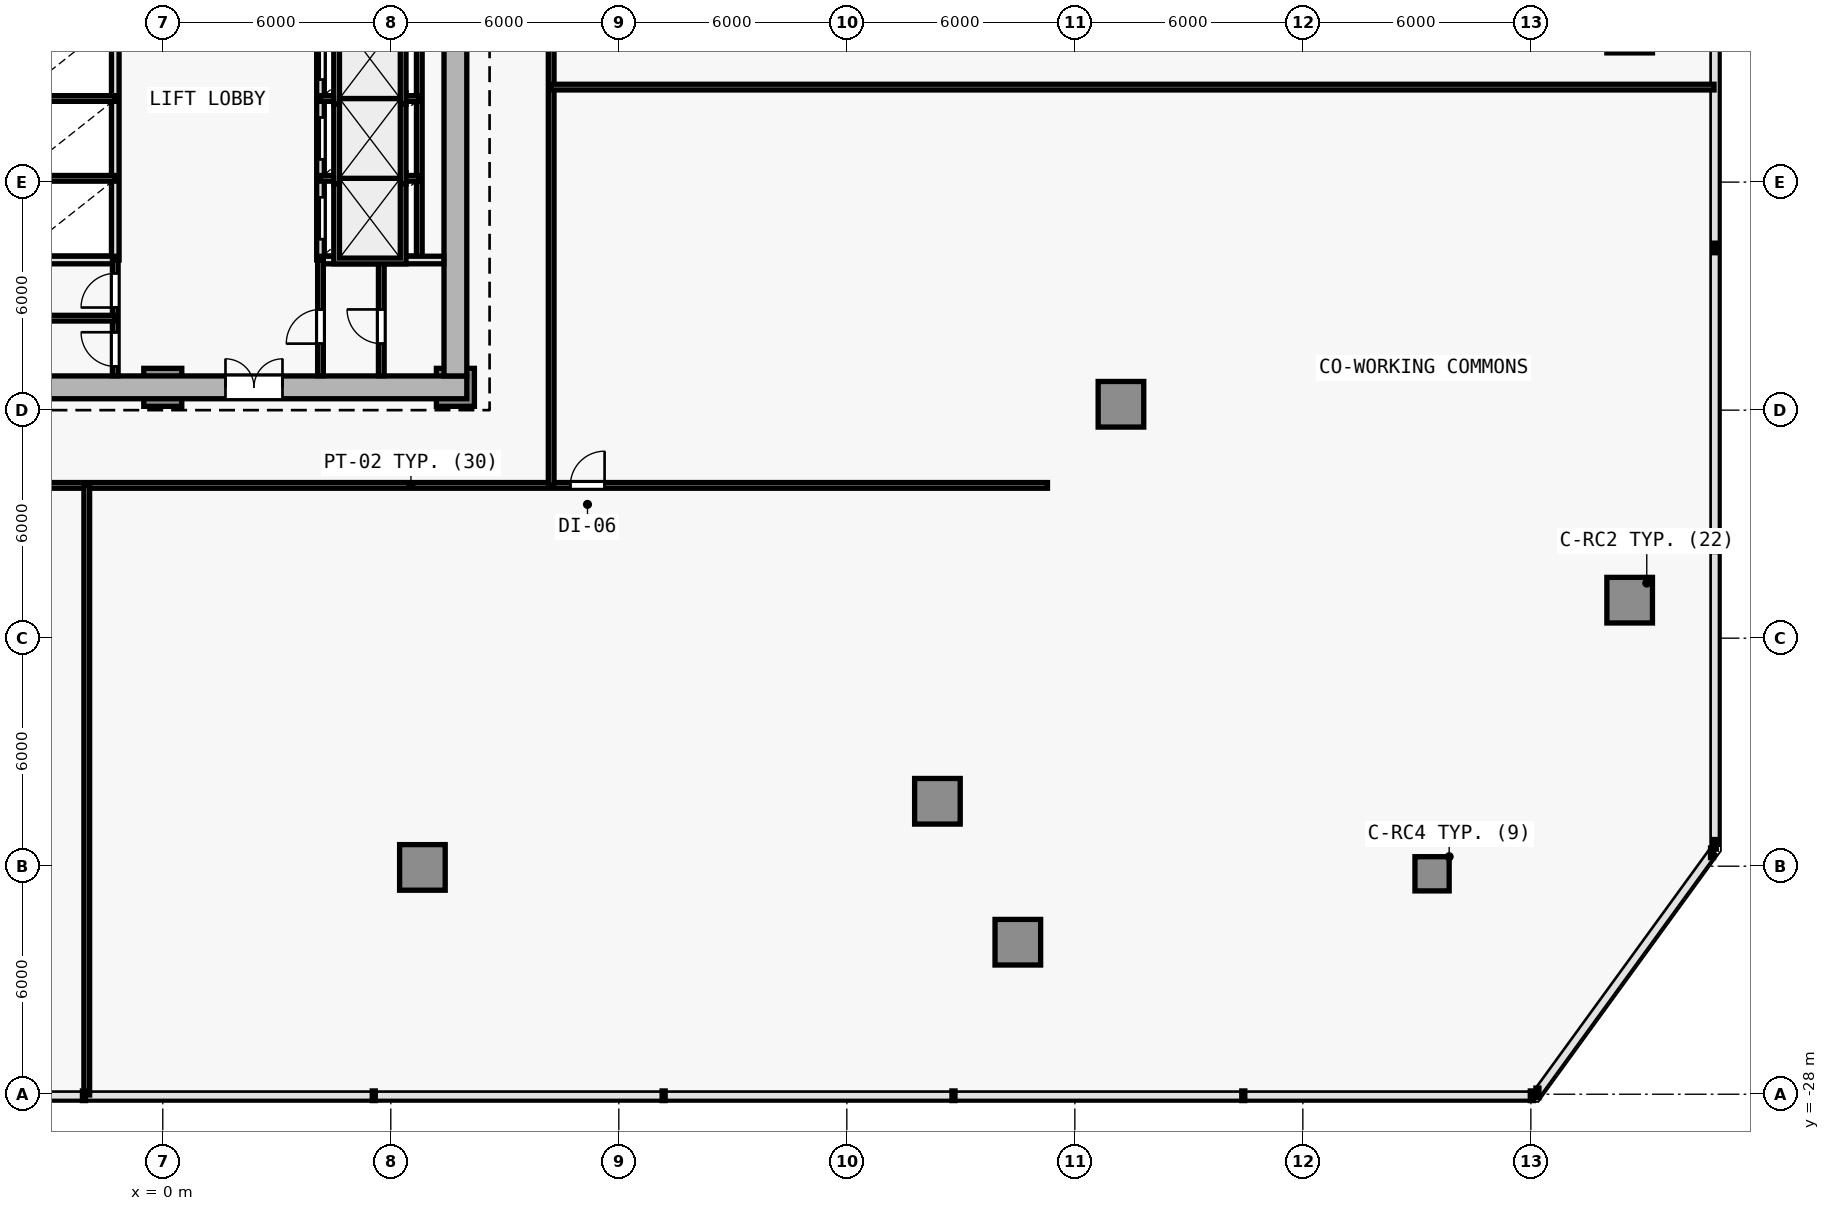
"""IFC4 building model, lengths in metres.
Left out: names, types, materials, properties, quantities, classifications, styles, units other than length and angle.
Written with IfcOpenShell. Run it as: python <this file> out.ifc"""

import sys

from ifc_helpers import new_model, si_unit, direction, frame, frame_2d, origin, origin_2d, place, context, subcontext, project, spatial, rectangle, extrude, element, fill, save


model = new_model("IFC4")
c1 = context("Model", 3, precision=1e-05, world=origin(), true_north=direction((0.0, 1.0)))
c2 = subcontext(c1, "Body", "Model", "MODEL_VIEW")
j1 = project(units=[si_unit("LENGTHUNIT", "METRE"), si_unit("PLANEANGLEUNIT", "RADIAN")], contexts=[c1])
p1 = place(None, origin())
s1 = spatial("IfcSite", under=j1, at=p1, CompositionType="ELEMENT")
p2 = place(p1, origin())
s2 = spatial("IfcBuilding", under=s1, at=p2, CompositionType="ELEMENT")
p3 = place(p2, frame((0.0, 0.0, 9.2)))
s3 = spatial("IfcBuildingStorey", under=s2, at=p3, CompositionType="ELEMENT", Elevation=9.2)
for number, where, z_axis, x_axis in (
    (1, (7.7, -9.4, 0.0), (0.0, 0.0, 1.0), (1.0, 0.0, 0.0)),
    (2, (0.0, -9.4, 0.0), (0.0, 0.0, 1.0), (1.0, 0.0, 0.0)),
):
    element("IfcColumn", number, at=place(p3, frame(where, z_axis=z_axis, x_axis=x_axis)), inside=s3, PredefinedType="COLUMN", context=c2, shape_type="SweptSolid", body=[
        extrude(rectangle(XDim=1.0, YDim=1.0, at=origin_2d()), origin(), (0.0, 0.0, 1.0), 4.2),
    ])
for number, where, z_axis, x_axis in (
    (3, (38.6, -15.0, 0.0), (0.0, 0.0, 1.0), (1.0, 0.0, 0.0)),
    (4, (38.6, 0.0, 0.0), (0.0, 0.0, 1.0), (1.0, 0.0, 0.0)),
    (5, (22.5, -24.0, 0.0), (0.0, 0.0, 1.0), (1.0, 0.0, 0.0)),
    (6, (6.832, -22.032, 0.0), (0.0, 0.0, 1.0), (1.0, 0.0, 0.0)),
    (7, (20.384, -20.292, 0.0), (0.0, 0.0, 1.0), (1.0, 0.0, 0.0)),
    (8, (25.213, -9.845, 0.0), (0.0, 0.0, 1.0), (1.0, 0.0, 0.0)),
):
    element("IfcColumn", number, at=place(p3, frame(where, z_axis=z_axis, x_axis=x_axis)), inside=s3, PredefinedType="COLUMN", context=c2, shape_type="SweptSolid", body=[
        extrude(rectangle(XDim=1.2, YDim=1.2, at=origin_2d()), origin(), (0.0, 0.0, 1.0), 4.2),
    ])
p4 = place(p3, frame((33.4, -22.2, 0.0), z_axis=(0.0, 0.0, 1.0), x_axis=(1.0, 0.0, 0.0)))
e9 = element("IfcColumn", 9, at=p4, inside=s3, PredefinedType="COLUMN", context=c2, shape_type="SweptSolid", body=[
    extrude(rectangle(XDim=0.9, YDim=0.9, at=origin_2d()), origin(), (0.0, 0.0, 1.0), 4.2),
])
p5 = place(p3, frame((-8.0, -9.4, 0.0), z_axis=(0.0, 0.0, 1.0), x_axis=(1.0, 0.0, 0.0)))
e10 = element("IfcWall", 10, at=p5, inside=s3, PredefinedType="SHEAR", context=c2, shape_type="SweptSolid", body=[
    extrude(rectangle(XDim=16.0, YDim=0.6, at=frame_2d((8.0, 0.0))), origin(), (0.0, 0.0, 1.0), 3.92),
])
p6 = place(p5, frame((9.65, 0.0, 0.0)))
e11 = element("IfcOpeningElement", 11, at=p6, cuts=e10, PredefinedType="OPENING", context=c2, shape_type="SweptSolid", body=[
    extrude(rectangle(XDim=1.5, YDim=2.2, at=frame_2d((0.75, 1.1))), frame((0.0, 0.31, 0.0), z_axis=(0.0, -1.0, 0.0), x_axis=(1.0, 0.0, 0.0)), (0.0, 0.0, 1.0), 0.62),
])
p7 = place(p3, frame((7.7, 9.9, 0.0), z_axis=(0.0, 0.0, 1.0), x_axis=(0.0, -1.0, 0.0)))
e12 = element("IfcWall", 12, at=p7, inside=s3, PredefinedType="SHEAR", context=c2, shape_type="SweptSolid", body=[
    extrude(rectangle(XDim=19.0, YDim=0.6, at=frame_2d((9.5, 0.0))), origin(), (0.0, 0.0, 1.0), 3.92),
])
p8 = place(p3, frame((4.15, -6.05, 0.0), z_axis=(0.0, 0.0, 1.0), x_axis=(0.0, 1.0, 0.0)))
e13 = element("IfcWall", 13, at=p8, inside=s3, PredefinedType="SOLIDWALL", context=c2, shape_type="SweptSolid", body=[
    extrude(rectangle(XDim=8.7, YDim=0.2, at=frame_2d((4.35, 0.0))), origin(), (0.0, 0.0, 1.0), 3.92),
])
p9 = place(p8, frame((0.55, 0.0, 0.0)))
e14 = element("IfcOpeningElement", 14, at=p9, cuts=e13, PredefinedType="OPENING", context=c2, shape_type="SweptSolid", body=[
    extrude(rectangle(XDim=1.1, YDim=2.15, at=frame_2d((0.55, 1.075))), frame((0.0, 0.11, 0.0), z_axis=(0.0, -1.0, 0.0), x_axis=(1.0, 0.0, 0.0)), (0.0, 0.0, 1.0), 0.22),
])
p10 = place(p8, frame((2.65, 0.0, 0.0)))
e15 = element("IfcOpeningElement", 15, at=p10, cuts=e13, PredefinedType="OPENING", context=c2, shape_type="SweptSolid", body=[
    extrude(rectangle(XDim=1.1, YDim=2.15, at=frame_2d((0.55, 1.075))), frame((0.0, 0.11, 0.0), z_axis=(0.0, -1.0, 0.0), x_axis=(1.0, 0.0, 0.0)), (0.0, 0.0, 1.0), 0.22),
])
p11 = place(p8, frame((4.75, 0.0, 0.0)))
e16 = element("IfcOpeningElement", 16, at=p11, cuts=e13, PredefinedType="OPENING", context=c2, shape_type="SweptSolid", body=[
    extrude(rectangle(XDim=1.1, YDim=2.15, at=frame_2d((0.55, 1.075))), frame((0.0, 0.11, 0.0), z_axis=(0.0, -1.0, 0.0), x_axis=(1.0, 0.0, 0.0)), (0.0, 0.0, 1.0), 0.22),
])
p12 = place(p8, frame((6.85, 0.0, 0.0)))
e17 = element("IfcOpeningElement", 17, at=p12, cuts=e13, PredefinedType="OPENING", context=c2, shape_type="SweptSolid", body=[
    extrude(rectangle(XDim=1.1, YDim=2.15, at=frame_2d((0.55, 1.075))), frame((0.0, 0.11, 0.0), z_axis=(0.0, -1.0, 0.0), x_axis=(1.0, 0.0, 0.0)), (0.0, 0.0, 1.0), 0.22),
])
p13 = place(p3, frame((6.75, -6.05, 0.0), z_axis=(0.0, 0.0, 1.0), x_axis=(0.0, 1.0, 0.0)))
e18 = element("IfcWall", 18, at=p13, inside=s3, PredefinedType="PARTITIONING", context=c2, shape_type="SweptSolid", body=[
    extrude(rectangle(XDim=8.7, YDim=0.15, at=frame_2d((4.35, 0.0))), origin(), (0.0, 0.0, 1.0), 3.92),
])
for number, where, z_axis, x_axis in (
    (19, (4.15, -3.9, 0.0), (0.0, 0.0, 1.0), (1.0, 0.0, 0.0)),
    (20, (4.15, -1.8, 0.0), (0.0, 0.0, 1.0), (1.0, 0.0, 0.0)),
):
    element("IfcWall", number, at=place(p3, frame(where, z_axis=z_axis, x_axis=x_axis)), inside=s3, PredefinedType="PARTITIONING", context=c2, shape_type="SweptSolid", body=[
        extrude(rectangle(XDim=2.6, YDim=0.15, at=frame_2d((1.3, 0.0))), origin(), (0.0, 0.0, 1.0), 3.92),
    ])
p14 = place(p3, frame((-1.25, -6.05, 0.0), z_axis=(0.0, 0.0, 1.0), x_axis=(0.0, 1.0, 0.0)))
e21 = element("IfcWall", 21, at=p14, inside=s3, PredefinedType="SOLIDWALL", context=c2, shape_type="SweptSolid", body=[
    extrude(rectangle(XDim=8.7, YDim=0.2, at=frame_2d((4.35, 0.0))), origin(), (0.0, 0.0, 1.0), 3.92),
])
for number, where, z_axis, x_axis in (
    (22, (-4.15, -3.9, 0.0), (0.0, 0.0, 1.0), (1.0, 0.0, 0.0)),
    (23, (-4.15, -1.8, 0.0), (0.0, 0.0, 1.0), (1.0, 0.0, 0.0)),
):
    element("IfcWall", number, at=place(p3, frame(where, z_axis=z_axis, x_axis=x_axis)), inside=s3, PredefinedType="PARTITIONING", context=c2, shape_type="SweptSolid", body=[
        extrude(rectangle(XDim=2.9, YDim=0.15, at=frame_2d((1.45, 0.0))), origin(), (0.0, 0.0, 1.0), 3.92),
    ])
p15 = place(p3, frame((-4.04, -6.05, 0.0), z_axis=(0.0, 0.0, 1.0), x_axis=(1.0, 0.0, 0.0)))
e24 = element("IfcWall", 24, at=p15, inside=s3, PredefinedType="SOLIDWALL", context=c2, shape_type="SweptSolid", body=[
    extrude(rectangle(XDim=2.79, YDim=0.2, at=frame_2d((1.395, 0.0))), origin(), (0.0, 0.0, 1.0), 3.92),
])
p16 = place(p3, frame((4.15, -6.05, 0.0), z_axis=(0.0, 0.0, 1.0), x_axis=(1.0, 0.0, 0.0)))
e25 = element("IfcWall", 25, at=p16, inside=s3, PredefinedType="SOLIDWALL", context=c2, shape_type="SweptSolid", body=[
    extrude(rectangle(XDim=3.245, YDim=0.2, at=frame_2d((1.623, 0.0))), origin(), (0.0, 0.0, 1.0), 3.92),
])
p17 = place(p3, frame((-1.25, -9.095, 0.0), z_axis=(0.0, 0.0, 1.0), x_axis=(0.0, 1.0, 0.0)))
e26 = element("IfcWall", 26, at=p17, inside=s3, PredefinedType="PARTITIONING", context=c2, shape_type="SweptSolid", body=[
    extrude(rectangle(XDim=3.045, YDim=0.15, at=frame_2d((1.522, 0.0))), origin(), (0.0, 0.0, 1.0), 3.92),
])
p18 = place(p17, frame((1.795, 0.0, 0.0)))
e27 = element("IfcOpeningElement", 27, at=p18, cuts=e26, PredefinedType="OPENING", context=c2, shape_type="SweptSolid", body=[
    extrude(rectangle(XDim=0.9, YDim=2.1, at=frame_2d((0.45, 1.05))), frame((0.0, 0.085, 0.0), z_axis=(0.0, -1.0, 0.0), x_axis=(1.0, 0.0, 0.0)), (0.0, 0.0, 1.0), 0.17),
])
p19 = place(p17, frame((0.245, 0.0, 0.0)))
e28 = element("IfcOpeningElement", 28, at=p19, cuts=e26, PredefinedType="OPENING", context=c2, shape_type="SweptSolid", body=[
    extrude(rectangle(XDim=0.9, YDim=2.1, at=frame_2d((0.45, 1.05))), frame((0.0, 0.085, 0.0), z_axis=(0.0, -1.0, 0.0), x_axis=(1.0, 0.0, 0.0)), (0.0, 0.0, 1.0), 0.17),
])
p20 = place(p3, frame((4.15, -9.095, 0.0), z_axis=(0.0, 0.0, 1.0), x_axis=(0.0, 1.0, 0.0)))
e29 = element("IfcWall", 29, at=p20, inside=s3, PredefinedType="PARTITIONING", context=c2, shape_type="SweptSolid", body=[
    extrude(rectangle(XDim=3.045, YDim=0.15, at=frame_2d((1.522, 0.0))), origin(), (0.0, 0.0, 1.0), 3.92),
])
p21 = place(p20, frame((0.845, 0.0, 0.0)))
e30 = element("IfcOpeningElement", 30, at=p21, cuts=e29, PredefinedType="OPENING", context=c2, shape_type="SweptSolid", body=[
    extrude(rectangle(XDim=0.9, YDim=2.1, at=frame_2d((0.45, 1.05))), frame((0.0, 0.085, 0.0), z_axis=(0.0, -1.0, 0.0), x_axis=(1.0, 0.0, 0.0)), (0.0, 0.0, 1.0), 0.17),
])
p22 = place(p3, frame((-7.395, -7.58, 0.0), z_axis=(0.0, 0.0, 1.0), x_axis=(1.0, 0.0, 0.0)))
e31 = element("IfcWall", 31, at=p22, inside=s3, PredefinedType="PARTITIONING", context=c2, shape_type="SweptSolid", body=[
    extrude(rectangle(XDim=6.145, YDim=0.15, at=frame_2d((3.073, 0.0))), origin(), (0.0, 0.0, 1.0), 3.92),
])
p23 = place(p3, frame((5.75, -9.095, 0.0), z_axis=(0.0, 0.0, 1.0), x_axis=(0.0, 1.0, 0.0)))
e32 = element("IfcWall", 32, at=p23, inside=s3, PredefinedType="PARTITIONING", context=c2, shape_type="SweptSolid", body=[
    extrude(rectangle(XDim=3.045, YDim=0.15, at=frame_2d((1.522, 0.0))), origin(), (0.0, 0.0, 1.0), 3.92),
])
p24 = place(p23, frame((0.845, 0.0, 0.0)))
e33 = element("IfcOpeningElement", 33, at=p24, cuts=e32, PredefinedType="OPENING", context=c2, shape_type="SweptSolid", body=[
    extrude(rectangle(XDim=0.9, YDim=2.1, at=frame_2d((0.45, 1.05))), frame((0.0, 0.085, 0.0), z_axis=(0.0, -1.0, 0.0), x_axis=(1.0, 0.0, 0.0)), (0.0, 0.0, 1.0), 0.17),
])
p25 = place(p3, frame((-10.22, -11.98, 0.0), z_axis=(0.0, 0.0, 1.0), x_axis=(1.0, 0.0, 0.0)))
e34 = element("IfcWall", 34, at=p25, inside=s3, PredefinedType="PARTITIONING", context=c2, shape_type="SweptSolid", body=[
    extrude(rectangle(XDim=33.5, YDim=0.15, at=frame_2d((16.75, 0.0))), origin(), (0.0, 0.0, 1.0), 3.195),
])
p26 = place(p25, frame((20.946, 0.0, 0.0)))
e35 = element("IfcOpeningElement", 35, at=p26, cuts=e34, PredefinedType="OPENING", context=c2, shape_type="SweptSolid", body=[
    extrude(rectangle(XDim=0.9, YDim=2.1, at=frame_2d((0.45, 1.05))), frame((0.0, 0.085, 0.0), z_axis=(0.0, -1.0, 0.0), x_axis=(1.0, 0.0, 0.0)), (0.0, 0.0, 1.0), 0.17),
])
p27 = place(p3, frame((10.22, -11.98, 0.0), z_axis=(0.0, 0.0, 1.0), x_axis=(0.0, 1.0, 0.0)))
e36 = element("IfcWall", 36, at=p27, inside=s3, PredefinedType="PARTITIONING", context=c2, shape_type="SweptSolid", body=[
    extrude(rectangle(XDim=18.1, YDim=0.15, at=frame_2d((9.05, 0.0))), origin(), (0.0, 0.0, 1.0), 3.195),
])
p28 = place(p3, frame((-2.0, -28.02, 0.0), z_axis=(0.0, 0.0, 1.0), x_axis=(0.0, 1.0, 0.0)))
e37 = element("IfcWall", 37, at=p28, inside=s3, PredefinedType="PARTITIONING", context=c2, shape_type="SweptSolid", body=[
    extrude(rectangle(XDim=16.04, YDim=0.15, at=frame_2d((8.02, 0.0))), origin(), (0.0, 0.0, 1.0), 3.195),
])
p29 = place(p3, frame((10.22, -1.5, 0.0), z_axis=(0.0, 0.0, 1.0), x_axis=(1.0, 0.0, 0.0)))
e38 = element("IfcWall", 38, at=p29, inside=s3, PredefinedType="PARTITIONING", context=c2, shape_type="SweptSolid", body=[
    extrude(rectangle(XDim=30.6, YDim=0.15, at=frame_2d((15.3, 0.0))), origin(), (0.0, 0.0, 1.0), 3.305),
])
p30 = place(p6, origin())
e39 = element("IfcDoor", 39, at=p30, inside=s3, OperationType="DOUBLE_DOOR_SINGLE_SWING", PredefinedType="DOOR", context=c2, shape_type="SweptSolid", body=[
    extrude(rectangle(XDim=1.5, YDim=2.2, at=frame_2d((0.75, 1.1))), frame((0.0, 0.025, 0.0), z_axis=(0.0, -1.0, 0.0), x_axis=(1.0, 0.0, 0.0)), (0.0, 0.0, 1.0), 0.05),
])
fill(e11, e39)
p31 = place(p9, origin())
e40 = element("IfcDoor", 40, at=p31, inside=s3, OperationType="DOUBLE_DOOR_SLIDING", PredefinedType="DOOR", context=c2, shape_type="SweptSolid", body=[
    extrude(rectangle(XDim=1.1, YDim=2.15, at=frame_2d((0.55, 1.075))), frame((0.0, 0.025, 0.0), z_axis=(0.0, -1.0, 0.0), x_axis=(1.0, 0.0, 0.0)), (0.0, 0.0, 1.0), 0.05),
])
fill(e14, e40)
p32 = place(p10, origin())
e41 = element("IfcDoor", 41, at=p32, inside=s3, OperationType="DOUBLE_DOOR_SLIDING", PredefinedType="DOOR", context=c2, shape_type="SweptSolid", body=[
    extrude(rectangle(XDim=1.1, YDim=2.15, at=frame_2d((0.55, 1.075))), frame((0.0, 0.025, 0.0), z_axis=(0.0, -1.0, 0.0), x_axis=(1.0, 0.0, 0.0)), (0.0, 0.0, 1.0), 0.05),
])
fill(e15, e41)
p33 = place(p11, origin())
e42 = element("IfcDoor", 42, at=p33, inside=s3, OperationType="DOUBLE_DOOR_SLIDING", PredefinedType="DOOR", context=c2, shape_type="SweptSolid", body=[
    extrude(rectangle(XDim=1.1, YDim=2.15, at=frame_2d((0.55, 1.075))), frame((0.0, 0.025, 0.0), z_axis=(0.0, -1.0, 0.0), x_axis=(1.0, 0.0, 0.0)), (0.0, 0.0, 1.0), 0.05),
])
fill(e16, e42)
p34 = place(p18, origin())
e43 = element("IfcDoor", 43, at=p34, inside=s3, OperationType="SINGLE_SWING_LEFT", PredefinedType="DOOR", context=c2, shape_type="SweptSolid", body=[
    extrude(rectangle(XDim=0.9, YDim=2.1, at=frame_2d((0.45, 1.05))), frame((0.0, 0.025, 0.0), z_axis=(0.0, -1.0, 0.0), x_axis=(1.0, 0.0, 0.0)), (0.0, 0.0, 1.0), 0.05),
])
fill(e27, e43)
p35 = place(p19, origin())
e44 = element("IfcDoor", 44, at=p35, inside=s3, OperationType="SINGLE_SWING_RIGHT", PredefinedType="DOOR", context=c2, shape_type="SweptSolid", body=[
    extrude(rectangle(XDim=0.9, YDim=2.1, at=frame_2d((0.45, 1.05))), frame((0.0, 0.025, 0.0), z_axis=(0.0, -1.0, 0.0), x_axis=(1.0, 0.0, 0.0)), (0.0, 0.0, 1.0), 0.05),
])
fill(e28, e44)
p36 = place(p21, origin())
e45 = element("IfcDoor", 45, at=p36, inside=s3, OperationType="SINGLE_SWING_LEFT", PredefinedType="DOOR", context=c2, shape_type="SweptSolid", body=[
    extrude(rectangle(XDim=0.9, YDim=2.1, at=frame_2d((0.45, 1.05))), frame((0.0, 0.025, 0.0), z_axis=(0.0, -1.0, 0.0), x_axis=(1.0, 0.0, 0.0)), (0.0, 0.0, 1.0), 0.05),
])
fill(e30, e45)
p37 = place(p24, origin())
e46 = element("IfcDoor", 46, at=p37, inside=s3, OperationType="SINGLE_SWING_RIGHT", PredefinedType="DOOR", context=c2, shape_type="SweptSolid", body=[
    extrude(rectangle(XDim=0.9, YDim=2.1, at=frame_2d((0.45, 1.05))), frame((0.0, 0.025, 0.0), z_axis=(0.0, -1.0, 0.0), x_axis=(1.0, 0.0, 0.0)), (0.0, 0.0, 1.0), 0.05),
])
fill(e33, e46)
p38 = place(p26, origin())
e47 = element("IfcDoor", 47, at=p38, inside=s3, OperationType="SINGLE_SWING_RIGHT", PredefinedType="DOOR", context=c2, shape_type="SweptSolid", body=[
    extrude(rectangle(XDim=0.9, YDim=2.1, at=frame_2d((0.45, 1.05))), frame((0.0, 0.025, 0.0), z_axis=(0.0, -1.0, 0.0), x_axis=(1.0, 0.0, 0.0)), (0.0, 0.0, 1.0), 0.05),
])
fill(e35, e47)
save(model, sys.argv[1])
